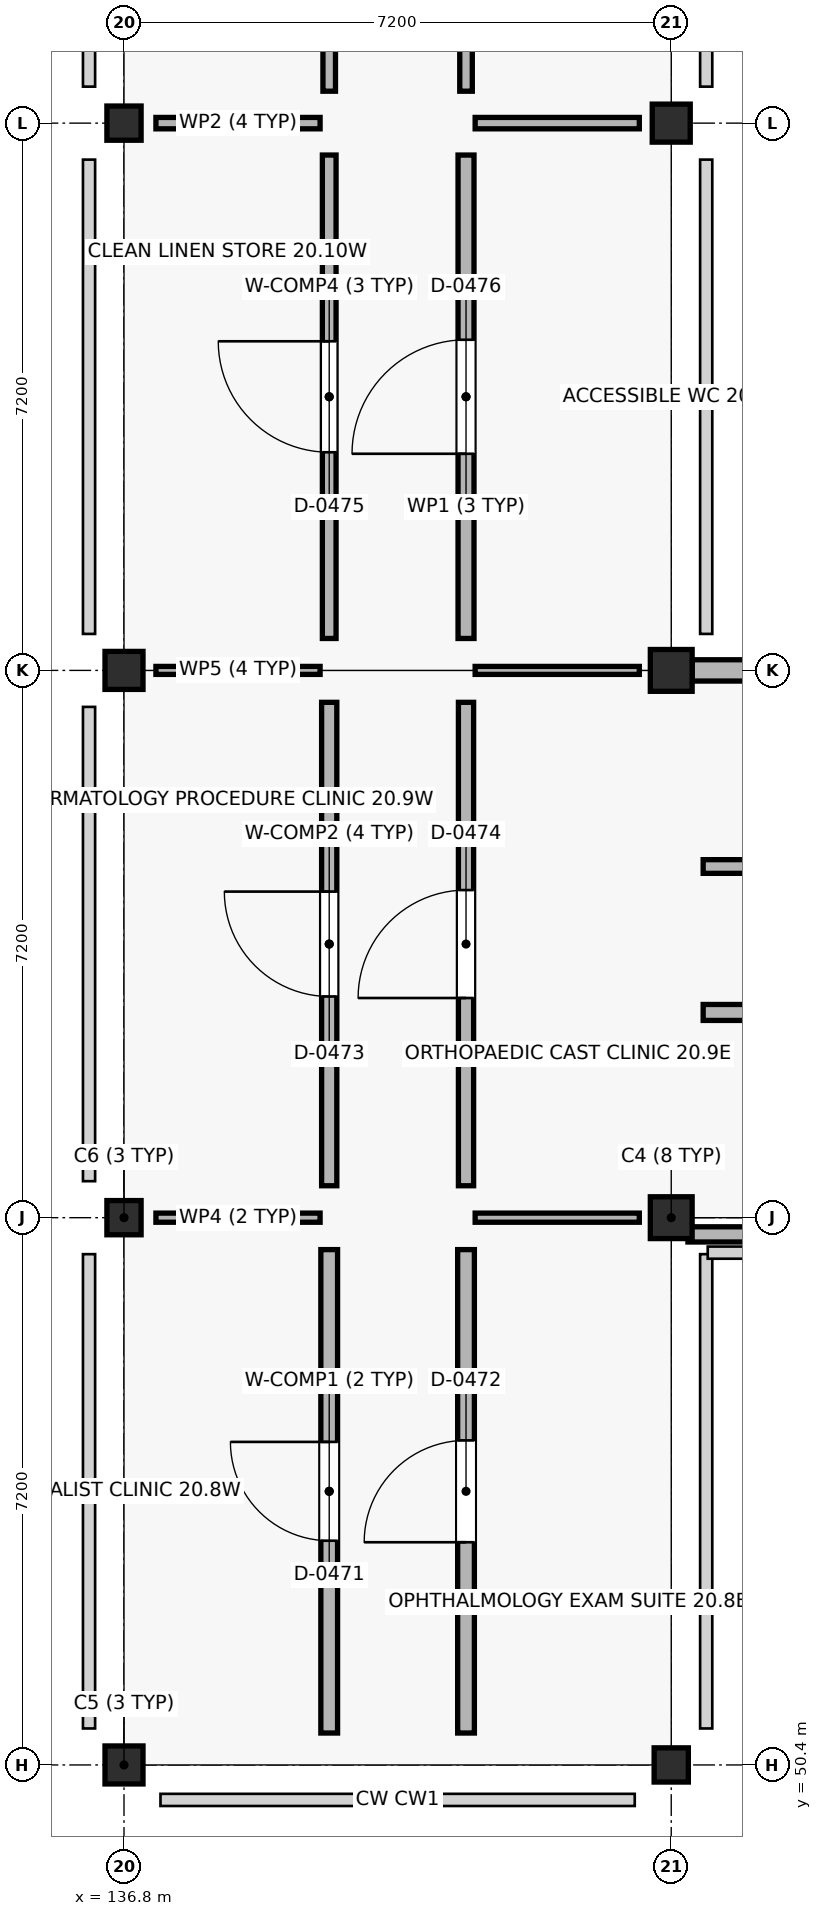
"""IFC4 building model, lengths in metres.
Left out: names, types, materials, properties, quantities, classifications, styles, units other than length and angle.
Written with IfcOpenShell. Run it as: python <this file> out.ifc"""

import sys

from ifc_helpers import new_model, si_unit, direction, frame, frame_2d, origin, origin_2d, place, context, subcontext, project, spatial, rectangle, extrude, element, fill, save


model = new_model("IFC4")
c1 = context("Model", 3, precision=1e-05, world=origin(), true_north=direction((0.0, 1.0)))
c2 = subcontext(c1, "Body", "Model", "MODEL_VIEW")
j1 = project(units=[si_unit("LENGTHUNIT", "METRE"), si_unit("PLANEANGLEUNIT", "RADIAN")], contexts=[c1])
p1 = place(None, origin())
s1 = spatial("IfcSite", under=j1, at=p1, CompositionType="ELEMENT")
p2 = place(p1, origin())
s2 = spatial("IfcBuilding", under=s1, at=p2, CompositionType="ELEMENT")
p3 = place(p2, frame((0.0, 0.0, 9.0)))
s3 = spatial("IfcBuildingStorey", under=s2, at=p3, CompositionType="ELEMENT", Elevation=9.0)
p4 = place(p3, frame((136.8, 50.4, 0.0), z_axis=(0.0, 0.0, 1.0), x_axis=(1.0, 0.0, 0.0)))
e1 = element("IfcColumn", 1, at=p4, inside=s3, PredefinedType="COLUMN", context=c2, shape_type="SweptSolid", body=[
    extrude(rectangle(XDim=0.5, YDim=0.5, at=origin_2d()), origin(), (0.0, 0.0, 1.0), 4.28),
])
p5 = place(p3, frame((136.8, 57.6, 0.0), z_axis=(0.0, 0.0, 1.0), x_axis=(1.0, 0.0, 0.0)))
e2 = element("IfcColumn", 2, at=p5, inside=s3, PredefinedType="COLUMN", context=c2, shape_type="SweptSolid", body=[
    extrude(rectangle(XDim=0.45, YDim=0.45, at=origin_2d()), origin(), (0.0, 0.0, 1.0), 4.28),
])
p6 = place(p3, frame((136.8, 64.8, 0.0), z_axis=(0.0, 0.0, 1.0), x_axis=(1.0, 0.0, 0.0)))
e3 = element("IfcColumn", 3, at=p6, inside=s3, PredefinedType="COLUMN", context=c2, shape_type="SweptSolid", body=[
    extrude(rectangle(XDim=0.5, YDim=0.5, at=origin_2d()), origin(), (0.0, 0.0, 1.0), 4.28),
])
for number, where, z_axis, x_axis in (
    (4, (136.8, 72.0, 0.0), (0.0, 0.0, 1.0), (1.0, 0.0, 0.0)),
    (5, (144.0, 50.4, 0.0), (0.0, 0.0, 1.0), (1.0, 0.0, 0.0)),
):
    element("IfcColumn", number, at=place(p3, frame(where, z_axis=z_axis, x_axis=x_axis)), inside=s3, PredefinedType="COLUMN", context=c2, shape_type="SweptSolid", body=[
        extrude(rectangle(XDim=0.45, YDim=0.45, at=origin_2d()), origin(), (0.0, 0.0, 1.0), 4.28),
    ])
for number, where, z_axis, x_axis in (
    (6, (144.0, 57.6, 0.0), (0.0, 0.0, 1.0), (1.0, 0.0, 0.0)),
    (7, (144.0, 64.8, 0.0), (0.0, 0.0, 1.0), (1.0, 0.0, 0.0)),
):
    element("IfcColumn", number, at=place(p3, frame(where, z_axis=z_axis, x_axis=x_axis)), inside=s3, PredefinedType="COLUMN", context=c2, shape_type="SweptSolid", body=[
        extrude(rectangle(XDim=0.55, YDim=0.55, at=origin_2d()), origin(), (0.0, 0.0, 1.0), 4.5),
    ])
p7 = place(p3, frame((144.0, 72.0, 0.0), z_axis=(0.0, 0.0, 1.0), x_axis=(1.0, 0.0, 0.0)))
e8 = element("IfcColumn", 8, at=p7, inside=s3, PredefinedType="COLUMN", context=c2, shape_type="SweptSolid", body=[
    extrude(rectangle(XDim=0.5, YDim=0.5, at=origin_2d()), origin(), (0.0, 0.0, 1.0), 4.28),
])
p8 = place(p3, frame((150.925, 64.8, 0.0), z_axis=(0.0, 0.0, 1.0), x_axis=(-1.0, 0.0, 0.0)))
e9 = element("IfcWall", 9, at=p8, inside=s3, PredefinedType="STANDARD", context=c2, shape_type="SweptSolid", body=[
    extrude(rectangle(XDim=6.65, YDim=0.28, at=frame_2d((3.325, 0.0))), origin(), (0.0, 0.0, 1.0), 3.59),
])
p9 = place(p8, frame((1.15, 0.0, 0.9)))
e10 = element("IfcOpeningElement", 10, at=p9, cuts=e9, PredefinedType="OPENING", context=c2, shape_type="SweptSolid", body=[
    extrude(rectangle(XDim=1.2, YDim=1.5, at=frame_2d((0.6, 0.75))), frame((0.0, 0.15, 0.0), z_axis=(0.0, -1.0, 0.0), x_axis=(1.0, 0.0, 0.0)), (0.0, 0.0, 1.0), 0.3),
])
p10 = place(p8, frame((4.3, 0.0, 0.9)))
e11 = element("IfcOpeningElement", 11, at=p10, cuts=e9, PredefinedType="OPENING", context=c2, shape_type="SweptSolid", body=[
    extrude(rectangle(XDim=1.2, YDim=1.5, at=frame_2d((0.6, 0.75))), frame((0.0, 0.15, 0.0), z_axis=(0.0, -1.0, 0.0), x_axis=(1.0, 0.0, 0.0)), (0.0, 0.0, 1.0), 0.3),
])
p11 = place(p3, frame((144.22, 57.38, 0.0), z_axis=(0.0, 0.0, 1.0), x_axis=(1.0, 0.0, 0.0)))
e12 = element("IfcWall", 12, at=p11, inside=s3, PredefinedType="PARAPET", context=c2, shape_type="SweptSolid", body=[
    extrude(rectangle(XDim=21.38, YDim=0.2, at=frame_2d((10.69, 0.0))), origin(), (0.0, 0.0, 1.0), 0.95),
])
p12 = place(p3, frame((139.5, 50.82, 0.0), z_axis=(0.0, 0.0, 1.0), x_axis=(0.0, 1.0, 0.0)))
e13 = element("IfcWall", 13, at=p12, inside=s3, PredefinedType="SOLIDWALL", context=c2, shape_type="SweptSolid", body=[
    extrude(rectangle(XDim=6.36, YDim=0.22, at=frame_2d((3.18, 0.0))), origin(), (0.0, 0.0, 1.0), 3.38),
])
p13 = place(p12, frame((2.53, 0.0, 0.0)))
e14 = element("IfcOpeningElement", 14, at=p13, cuts=e13, PredefinedType="OPENING", context=c2, shape_type="SweptSolid", body=[
    extrude(rectangle(XDim=1.3, YDim=2.14, at=frame_2d((0.65, 1.07))), frame((0.0, 0.12, 0.0), z_axis=(0.0, -1.0, 0.0), x_axis=(1.0, 0.0, 0.0)), (0.0, 0.0, 1.0), 0.24),
])
p14 = place(p3, frame((137.22, 57.6, 0.0), z_axis=(0.0, 0.0, 1.0), x_axis=(1.0, 0.0, 0.0)))
e15 = element("IfcWall", 15, at=p14, inside=s3, PredefinedType="PARTITIONING", context=c2, shape_type="SweptSolid", body=[
    extrude(rectangle(XDim=2.16, YDim=0.12, at=frame_2d((1.08, 0.0))), origin(), (0.0, 0.0, 1.0), 3.38),
])
p15 = place(p3, frame((141.3, 50.82, 0.0), z_axis=(0.0, 0.0, 1.0), x_axis=(0.0, 1.0, 0.0)))
e16 = element("IfcWall", 16, at=p15, inside=s3, PredefinedType="SOLIDWALL", context=c2, shape_type="SweptSolid", body=[
    extrude(rectangle(XDim=6.36, YDim=0.22, at=frame_2d((3.18, 0.0))), origin(), (0.0, 0.0, 1.0), 3.38),
])
p16 = place(p15, frame((2.51, 0.0, 0.0)))
e17 = element("IfcOpeningElement", 17, at=p16, cuts=e16, PredefinedType="OPENING", context=c2, shape_type="SweptSolid", body=[
    extrude(rectangle(XDim=1.34, YDim=2.14, at=frame_2d((0.67, 1.07))), frame((0.0, 0.12, 0.0), z_axis=(0.0, -1.0, 0.0), x_axis=(1.0, 0.0, 0.0)), (0.0, 0.0, 1.0), 0.24),
])
p17 = place(p3, frame((141.42, 57.6, 0.0), z_axis=(0.0, 0.0, 1.0), x_axis=(1.0, 0.0, 0.0)))
e18 = element("IfcWall", 18, at=p17, inside=s3, PredefinedType="PARTITIONING", context=c2, shape_type="SweptSolid", body=[
    extrude(rectangle(XDim=2.16, YDim=0.12, at=frame_2d((1.08, 0.0))), origin(), (0.0, 0.0, 1.0), 3.38),
])
p18 = place(p3, frame((139.5, 58.02, 0.0), z_axis=(0.0, 0.0, 1.0), x_axis=(0.0, 1.0, 0.0)))
e19 = element("IfcWall", 19, at=p18, inside=s3, PredefinedType="SOLIDWALL", context=c2, shape_type="SweptSolid", body=[
    extrude(rectangle(XDim=6.36, YDim=0.2, at=frame_2d((3.18, 0.0))), origin(), (0.0, 0.0, 1.0), 3.38),
])
p19 = place(p18, frame((2.49, 0.0, 0.0)))
e20 = element("IfcOpeningElement", 20, at=p19, cuts=e19, PredefinedType="OPENING", context=c2, shape_type="SweptSolid", body=[
    extrude(rectangle(XDim=1.38, YDim=2.14, at=frame_2d((0.69, 1.07))), frame((0.0, 0.11, 0.0), z_axis=(0.0, -1.0, 0.0), x_axis=(1.0, 0.0, 0.0)), (0.0, 0.0, 1.0), 0.22),
])
p20 = place(p3, frame((137.22, 64.8, 0.0), z_axis=(0.0, 0.0, 1.0), x_axis=(1.0, 0.0, 0.0)))
e21 = element("IfcWall", 21, at=p20, inside=s3, PredefinedType="PARTITIONING", context=c2, shape_type="SweptSolid", body=[
    extrude(rectangle(XDim=2.16, YDim=0.105, at=frame_2d((1.08, 0.0))), origin(), (0.0, 0.0, 1.0), 3.38),
])
p21 = place(p3, frame((141.3, 58.02, 0.0), z_axis=(0.0, 0.0, 1.0), x_axis=(0.0, 1.0, 0.0)))
e22 = element("IfcWall", 22, at=p21, inside=s3, PredefinedType="SOLIDWALL", context=c2, shape_type="SweptSolid", body=[
    extrude(rectangle(XDim=6.36, YDim=0.2, at=frame_2d((3.18, 0.0))), origin(), (0.0, 0.0, 1.0), 3.38),
])
p22 = place(p21, frame((2.47, 0.0, 0.0)))
e23 = element("IfcOpeningElement", 23, at=p22, cuts=e22, PredefinedType="OPENING", context=c2, shape_type="SweptSolid", body=[
    extrude(rectangle(XDim=1.42, YDim=2.14, at=frame_2d((0.71, 1.07))), frame((0.0, 0.11, 0.0), z_axis=(0.0, -1.0, 0.0), x_axis=(1.0, 0.0, 0.0)), (0.0, 0.0, 1.0), 0.22),
])
p23 = place(p3, frame((141.42, 64.8, 0.0), z_axis=(0.0, 0.0, 1.0), x_axis=(1.0, 0.0, 0.0)))
e24 = element("IfcWall", 24, at=p23, inside=s3, PredefinedType="PARTITIONING", context=c2, shape_type="SweptSolid", body=[
    extrude(rectangle(XDim=2.16, YDim=0.105, at=frame_2d((1.08, 0.0))), origin(), (0.0, 0.0, 1.0), 3.38),
])
p24 = place(p3, frame((139.5, 65.22, 0.0), z_axis=(0.0, 0.0, 1.0), x_axis=(0.0, 1.0, 0.0)))
e25 = element("IfcWall", 25, at=p24, inside=s3, PredefinedType="PARTITIONING", context=c2, shape_type="SweptSolid", body=[
    extrude(rectangle(XDim=6.36, YDim=0.18, at=frame_2d((3.18, 0.0))), origin(), (0.0, 0.0, 1.0), 3.38),
])
p25 = place(p24, frame((2.45, 0.0, 0.0)))
e26 = element("IfcOpeningElement", 26, at=p25, cuts=e25, PredefinedType="OPENING", context=c2, shape_type="SweptSolid", body=[
    extrude(rectangle(XDim=1.46, YDim=2.14, at=frame_2d((0.73, 1.07))), frame((0.0, 0.1, 0.0), z_axis=(0.0, -1.0, 0.0), x_axis=(1.0, 0.0, 0.0)), (0.0, 0.0, 1.0), 0.2),
])
p26 = place(p3, frame((137.22, 72.0, 0.0), z_axis=(0.0, 0.0, 1.0), x_axis=(1.0, 0.0, 0.0)))
e27 = element("IfcWall", 27, at=p26, inside=s3, PredefinedType="PARTITIONING", context=c2, shape_type="SweptSolid", body=[
    extrude(rectangle(XDim=2.16, YDim=0.15, at=frame_2d((1.08, 0.0))), origin(), (0.0, 0.0, 1.0), 3.38),
])
p27 = place(p3, frame((141.3, 65.22, 0.0), z_axis=(0.0, 0.0, 1.0), x_axis=(0.0, 1.0, 0.0)))
e28 = element("IfcWall", 28, at=p27, inside=s3, PredefinedType="PLUMBINGWALL", context=c2, shape_type="SweptSolid", body=[
    extrude(rectangle(XDim=6.36, YDim=0.21, at=frame_2d((3.18, 0.0))), origin(), (0.0, 0.0, 1.0), 3.38),
])
p28 = place(p27, frame((2.43, 0.0, 0.0)))
e29 = element("IfcOpeningElement", 29, at=p28, cuts=e28, PredefinedType="OPENING", context=c2, shape_type="SweptSolid", body=[
    extrude(rectangle(XDim=1.5, YDim=2.14, at=frame_2d((0.75, 1.07))), frame((0.0, 0.115, 0.0), z_axis=(0.0, -1.0, 0.0), x_axis=(1.0, 0.0, 0.0)), (0.0, 0.0, 1.0), 0.23),
])
p29 = place(p3, frame((141.42, 72.0, 0.0), z_axis=(0.0, 0.0, 1.0), x_axis=(1.0, 0.0, 0.0)))
e30 = element("IfcWall", 30, at=p29, inside=s3, PredefinedType="PARTITIONING", context=c2, shape_type="SweptSolid", body=[
    extrude(rectangle(XDim=2.16, YDim=0.15, at=frame_2d((1.08, 0.0))), origin(), (0.0, 0.0, 1.0), 3.38),
])
p30 = place(p3, frame((139.5, 72.42, 0.0), z_axis=(0.0, 0.0, 1.0), x_axis=(0.0, 1.0, 0.0)))
e31 = element("IfcWall", 31, at=p30, inside=s3, PredefinedType="PARTITIONING", context=c2, shape_type="SweptSolid", body=[
    extrude(rectangle(XDim=6.36, YDim=0.165, at=frame_2d((3.18, 0.0))), origin(), (0.0, 0.0, 1.0), 3.38),
])
p31 = place(p30, frame((2.73, 0.0, 0.0)))
e32 = element("IfcOpeningElement", 32, at=p31, cuts=e31, PredefinedType="OPENING", context=c2, shape_type="SweptSolid", body=[
    extrude(rectangle(XDim=0.9, YDim=2.19, at=frame_2d((0.45, 1.095))), frame((0.0, 0.093, 0.0), z_axis=(0.0, -1.0, 0.0), x_axis=(1.0, 0.0, 0.0)), (0.0, 0.0, 1.0), 0.185),
])
p32 = place(p3, frame((141.3, 72.42, 0.0), z_axis=(0.0, 0.0, 1.0), x_axis=(0.0, 1.0, 0.0)))
e33 = element("IfcWall", 33, at=p32, inside=s3, PredefinedType="PARTITIONING", context=c2, shape_type="SweptSolid", body=[
    extrude(rectangle(XDim=6.36, YDim=0.165, at=frame_2d((3.18, 0.0))), origin(), (0.0, 0.0, 1.0), 3.38),
])
p33 = place(p32, frame((2.71, 0.0, 0.0)))
e34 = element("IfcOpeningElement", 34, at=p33, cuts=e33, PredefinedType="OPENING", context=c2, shape_type="SweptSolid", body=[
    extrude(rectangle(XDim=0.94, YDim=2.19, at=frame_2d((0.47, 1.095))), frame((0.0, 0.093, 0.0), z_axis=(0.0, -1.0, 0.0), x_axis=(1.0, 0.0, 0.0)), (0.0, 0.0, 1.0), 0.185),
])
p34 = place(p3, frame((144.42, 60.3, 0.0), z_axis=(0.0, 0.0, 1.0), x_axis=(1.0, 0.0, 0.0)))
e35 = element("IfcWall", 35, at=p34, inside=s3, PredefinedType="PLUMBINGWALL", context=c2, shape_type="SweptSolid", body=[
    extrude(rectangle(XDim=6.36, YDim=0.21, at=frame_2d((3.18, 0.0))), origin(), (0.0, 0.0, 1.0), 3.38),
])
p35 = place(p34, frame((2.51, 0.0, 0.0)))
e36 = element("IfcOpeningElement", 36, at=p35, cuts=e35, PredefinedType="OPENING", context=c2, shape_type="SweptSolid", body=[
    extrude(rectangle(XDim=1.34, YDim=2.19, at=frame_2d((0.67, 1.095))), frame((0.0, 0.115, 0.0), z_axis=(0.0, -1.0, 0.0), x_axis=(1.0, 0.0, 0.0)), (0.0, 0.0, 1.0), 0.23),
])
p36 = place(p3, frame((144.42, 62.22, 0.0), z_axis=(0.0, 0.0, 1.0), x_axis=(1.0, 0.0, 0.0)))
e37 = element("IfcWall", 37, at=p36, inside=s3, PredefinedType="PARTITIONING", context=c2, shape_type="SweptSolid", body=[
    extrude(rectangle(XDim=6.36, YDim=0.18, at=frame_2d((3.18, 0.0))), origin(), (0.0, 0.0, 1.0), 3.38),
])
p37 = place(p36, frame((2.49, 0.0, 0.0)))
e38 = element("IfcOpeningElement", 38, at=p37, cuts=e37, PredefinedType="OPENING", context=c2, shape_type="SweptSolid", body=[
    extrude(rectangle(XDim=1.38, YDim=2.19, at=frame_2d((0.69, 1.095))), frame((0.0, 0.1, 0.0), z_axis=(0.0, -1.0, 0.0), x_axis=(1.0, 0.0, 0.0)), (0.0, 0.0, 1.0), 0.2),
])
p38 = place(p13, origin())
e39 = element("IfcDoor", 39, at=p38, inside=s3, OperationType="SINGLE_SWING_RIGHT", PredefinedType="DOOR", context=c2, shape_type="SweptSolid", body=[
    extrude(rectangle(XDim=1.3, YDim=2.14, at=frame_2d((0.65, 1.07))), frame((0.0, 0.025, 0.0), z_axis=(0.0, -1.0, 0.0), x_axis=(1.0, 0.0, 0.0)), (0.0, 0.0, 1.0), 0.05),
])
fill(e14, e39)
p39 = place(p16, origin())
e40 = element("IfcDoor", 40, at=p39, inside=s3, OperationType="SINGLE_SWING_LEFT", PredefinedType="DOOR", context=c2, shape_type="SweptSolid", body=[
    extrude(rectangle(XDim=1.34, YDim=2.14, at=frame_2d((0.67, 1.07))), frame((0.0, 0.025, 0.0), z_axis=(0.0, -1.0, 0.0), x_axis=(1.0, 0.0, 0.0)), (0.0, 0.0, 1.0), 0.05),
])
fill(e17, e40)
p40 = place(p19, origin())
e41 = element("IfcDoor", 41, at=p40, inside=s3, OperationType="SINGLE_SWING_RIGHT", PredefinedType="DOOR", context=c2, shape_type="SweptSolid", body=[
    extrude(rectangle(XDim=1.38, YDim=2.14, at=frame_2d((0.69, 1.07))), frame((0.0, 0.025, 0.0), z_axis=(0.0, -1.0, 0.0), x_axis=(1.0, 0.0, 0.0)), (0.0, 0.0, 1.0), 0.05),
])
fill(e20, e41)
p41 = place(p22, origin())
e42 = element("IfcDoor", 42, at=p41, inside=s3, OperationType="SINGLE_SWING_LEFT", PredefinedType="DOOR", context=c2, shape_type="SweptSolid", body=[
    extrude(rectangle(XDim=1.42, YDim=2.14, at=frame_2d((0.71, 1.07))), frame((0.0, 0.025, 0.0), z_axis=(0.0, -1.0, 0.0), x_axis=(1.0, 0.0, 0.0)), (0.0, 0.0, 1.0), 0.05),
])
fill(e23, e42)
p42 = place(p25, origin())
e43 = element("IfcDoor", 43, at=p42, inside=s3, OperationType="SINGLE_SWING_RIGHT", PredefinedType="DOOR", context=c2, shape_type="SweptSolid", body=[
    extrude(rectangle(XDim=1.46, YDim=2.14, at=frame_2d((0.73, 1.07))), frame((0.0, 0.025, 0.0), z_axis=(0.0, -1.0, 0.0), x_axis=(1.0, 0.0, 0.0)), (0.0, 0.0, 1.0), 0.05),
])
fill(e26, e43)
p43 = place(p28, origin())
e44 = element("IfcDoor", 44, at=p43, inside=s3, OperationType="SINGLE_SWING_LEFT", PredefinedType="DOOR", context=c2, shape_type="SweptSolid", body=[
    extrude(rectangle(XDim=1.5, YDim=2.14, at=frame_2d((0.75, 1.07))), frame((0.0, 0.025, 0.0), z_axis=(0.0, -1.0, 0.0), x_axis=(1.0, 0.0, 0.0)), (0.0, 0.0, 1.0), 0.05),
])
fill(e29, e44)
save(model, sys.argv[1])
